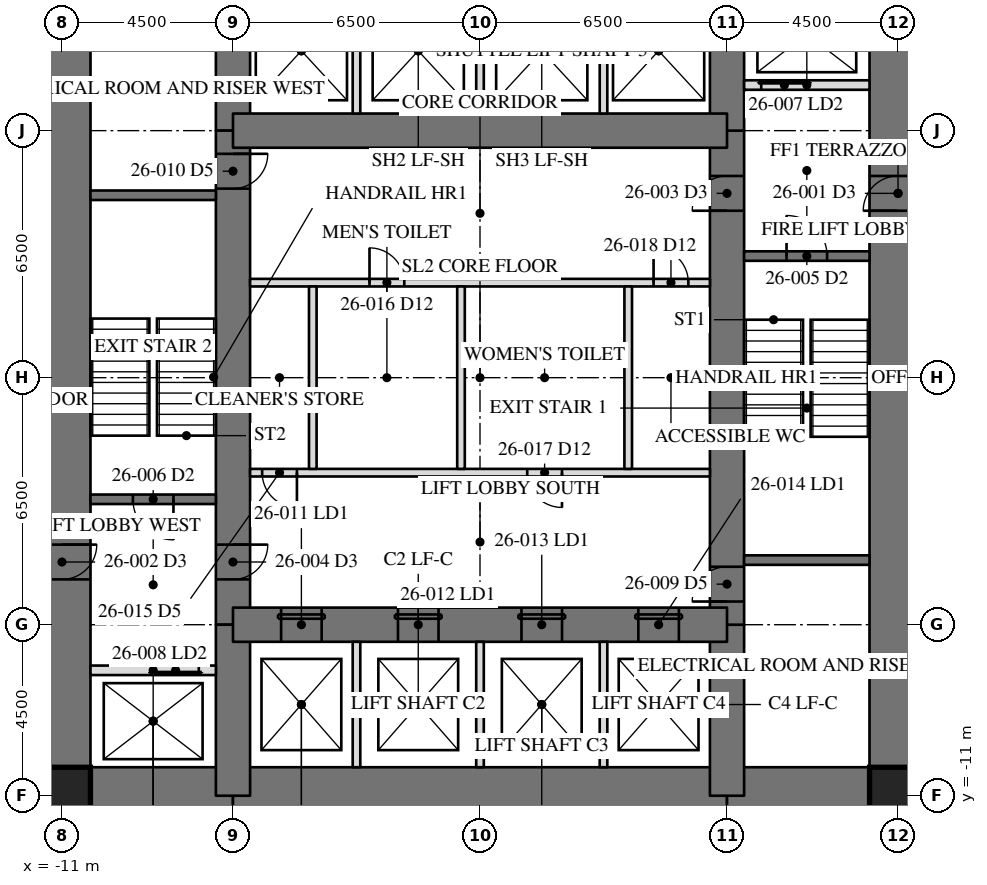
"""IFC4 building model, lengths in metres.
Left out: names, types, materials, properties, quantities, classifications, styles, units other than length and angle.
Written with IfcOpenShell. Run it as: python <this file> out.ifc"""

import sys

from ifc_helpers import new_model, si_unit, direction, frame, frame_2d, origin, origin_2d, place, context, subcontext, project, spatial, rectangle, hollow_rectangle, extrude, element, fill, save


model = new_model("IFC4")
c1 = context("Model", 3, precision=1e-05, world=origin(), true_north=direction((0.0, 1.0)))
c2 = subcontext(c1, "Body", "Model", "MODEL_VIEW")
j1 = project(units=[si_unit("LENGTHUNIT", "METRE"), si_unit("PLANEANGLEUNIT", "RADIAN")], contexts=[c1])
p1 = place(None, origin())
s1 = spatial("IfcSite", under=j1, at=p1, CompositionType="ELEMENT")
p2 = place(p1, origin())
s2 = spatial("IfcBuilding", under=s1, at=p2, CompositionType="ELEMENT")
p3 = place(p2, frame((0.0, 0.0, 113.1)))
s3 = spatial("IfcBuildingStorey", under=s2, at=p3, CompositionType="ELEMENT", Elevation=113.1)
p4 = place(p3, frame((11.0, -11.0, 0.0), z_axis=(0.0, 0.0, 1.0), x_axis=(0.0, 1.0, 0.0)))
e1 = element("IfcWall", 1, at=p4, inside=s3, PredefinedType="SHEAR", context=c2, shape_type="SweptSolid", body=[
    extrude(rectangle(XDim=22.0, YDim=1.5, at=frame_2d((11.0, 0.0))), origin(), (0.0, 0.0, 1.0), 4.1),
])
p5 = place(p4, frame((15.393, 0.0, 0.0)))
e2 = element("IfcOpeningElement", 2, at=p5, cuts=e1, PredefinedType="OPENING", context=c2, shape_type="SweptSolid", body=[
    extrude(rectangle(XDim=0.915, YDim=2.134, at=frame_2d((0.458, 1.067))), frame((0.0, 0.76, 0.0), z_axis=(0.0, -1.0, 0.0), x_axis=(1.0, 0.0, 0.0)), (0.0, 0.0, 1.0), 1.52),
])
p6 = place(p3, frame((-11.0, 11.0, 0.0), z_axis=(0.0, 0.0, 1.0), x_axis=(0.0, -1.0, 0.0)))
e3 = element("IfcWall", 3, at=p6, inside=s3, PredefinedType="SHEAR", context=c2, shape_type="SweptSolid", body=[
    extrude(rectangle(XDim=22.0, YDim=1.5, at=frame_2d((11.0, 0.0))), origin(), (0.0, 0.0, 1.0), 4.1),
])
p7 = place(p6, frame((15.393, 0.0, 0.0)))
e4 = element("IfcOpeningElement", 4, at=p7, cuts=e3, PredefinedType="OPENING", context=c2, shape_type="SweptSolid", body=[
    extrude(rectangle(XDim=0.915, YDim=2.134, at=frame_2d((0.458, 1.067))), frame((0.0, 0.76, 0.0), z_axis=(0.0, -1.0, 0.0), x_axis=(1.0, 0.0, 0.0)), (0.0, 0.0, 1.0), 1.52),
])
p8 = place(p3, frame((-11.0, -11.0, 0.0), z_axis=(0.0, 0.0, 1.0), x_axis=(1.0, 0.0, 0.0)))
e5 = element("IfcWall", 5, at=p8, inside=s3, PredefinedType="SHEAR", context=c2, shape_type="SweptSolid", body=[
    extrude(rectangle(XDim=4.5, YDim=1.5, at=frame_2d((2.25, 0.0))), origin(), (0.0, 0.0, 1.0), 4.1),
])
p9 = place(p3, frame((-6.5, -11.0, 0.0), z_axis=(0.0, 0.0, 1.0), x_axis=(1.0, 0.0, 0.0)))
e6 = element("IfcWall", 6, at=p9, inside=s3, PredefinedType="SHEAR", context=c2, shape_type="SweptSolid", body=[
    extrude(rectangle(XDim=13.0, YDim=1.5, at=frame_2d((6.5, 0.0))), origin(), (0.0, 0.0, 1.0), 4.1),
])
p10 = place(p3, frame((6.5, -11.0, 0.0), z_axis=(0.0, 0.0, 1.0), x_axis=(1.0, 0.0, 0.0)))
e7 = element("IfcWall", 7, at=p10, inside=s3, PredefinedType="SHEAR", context=c2, shape_type="SweptSolid", body=[
    extrude(rectangle(XDim=4.5, YDim=1.5, at=frame_2d((2.25, 0.0))), origin(), (0.0, 0.0, 1.0), 4.1),
])
p11 = place(p3, frame((6.5, -11.0, 0.0), z_axis=(0.0, 0.0, 1.0), x_axis=(0.0, 1.0, 0.0)))
e8 = element("IfcWall", 8, at=p11, inside=s3, PredefinedType="SHEAR", context=c2, shape_type="SweptSolid", body=[
    extrude(rectangle(XDim=4.5, YDim=0.9, at=frame_2d((2.25, 0.0))), origin(), (0.0, 0.0, 1.0), 4.1),
])
p12 = place(p3, frame((6.5, -6.5, 0.0), z_axis=(0.0, 0.0, 1.0), x_axis=(0.0, 1.0, 0.0)))
e9 = element("IfcWall", 9, at=p12, inside=s3, PredefinedType="SHEAR", context=c2, shape_type="SweptSolid", body=[
    extrude(rectangle(XDim=13.0, YDim=0.9, at=frame_2d((6.5, 0.0))), origin(), (0.0, 0.0, 1.0), 4.1),
])
p13 = place(p12, frame((10.893, 0.0, 0.0)))
e10 = element("IfcOpeningElement", 10, at=p13, cuts=e9, PredefinedType="OPENING", context=c2, shape_type="SweptSolid", body=[
    extrude(rectangle(XDim=0.915, YDim=2.134, at=frame_2d((0.458, 1.067))), frame((0.0, 0.46, 0.0), z_axis=(0.0, -1.0, 0.0), x_axis=(1.0, 0.0, 0.0)), (0.0, 0.0, 1.0), 0.92),
])
p14 = place(p12, frame((0.61, 0.0, 0.0)))
e11 = element("IfcOpeningElement", 11, at=p14, cuts=e9, PredefinedType="OPENING", context=c2, shape_type="SweptSolid", body=[
    extrude(rectangle(XDim=0.915, YDim=2.134, at=frame_2d((0.458, 1.067))), frame((0.0, 0.46, 0.0), z_axis=(0.0, -1.0, 0.0), x_axis=(1.0, 0.0, 0.0)), (0.0, 0.0, 1.0), 0.92),
])
for number, where, z_axis, x_axis in (
    (12, (6.5, 6.5, 0.0), (0.0, 0.0, 1.0), (0.0, 1.0, 0.0)),
    (13, (-6.5, 11.0, 0.0), (0.0, 0.0, 1.0), (0.0, -1.0, 0.0)),
):
    element("IfcWall", number, at=place(p3, frame(where, z_axis=z_axis, x_axis=x_axis)), inside=s3, PredefinedType="SHEAR", context=c2, shape_type="SweptSolid", body=[
        extrude(rectangle(XDim=4.5, YDim=0.9, at=frame_2d((2.25, 0.0))), origin(), (0.0, 0.0, 1.0), 4.1),
    ])
p15 = place(p3, frame((-6.5, 6.5, 0.0), z_axis=(0.0, 0.0, 1.0), x_axis=(0.0, -1.0, 0.0)))
e14 = element("IfcWall", 14, at=p15, inside=s3, PredefinedType="SHEAR", context=c2, shape_type="SweptSolid", body=[
    extrude(rectangle(XDim=13.0, YDim=0.9, at=frame_2d((6.5, 0.0))), origin(), (0.0, 0.0, 1.0), 4.1),
])
p16 = place(p15, frame((10.893, 0.0, 0.0)))
e15 = element("IfcOpeningElement", 15, at=p16, cuts=e14, PredefinedType="OPENING", context=c2, shape_type="SweptSolid", body=[
    extrude(rectangle(XDim=0.915, YDim=2.134, at=frame_2d((0.458, 1.067))), frame((0.0, 0.46, 0.0), z_axis=(0.0, -1.0, 0.0), x_axis=(1.0, 0.0, 0.0)), (0.0, 0.0, 1.0), 0.92),
])
p17 = place(p15, frame((0.61, 0.0, 0.0)))
e16 = element("IfcOpeningElement", 16, at=p17, cuts=e14, PredefinedType="OPENING", context=c2, shape_type="SweptSolid", body=[
    extrude(rectangle(XDim=0.915, YDim=2.134, at=frame_2d((0.458, 1.067))), frame((0.0, 0.46, 0.0), z_axis=(0.0, -1.0, 0.0), x_axis=(1.0, 0.0, 0.0)), (0.0, 0.0, 1.0), 0.92),
])
p18 = place(p3, frame((-6.5, -6.5, 0.0), z_axis=(0.0, 0.0, 1.0), x_axis=(0.0, -1.0, 0.0)))
e17 = element("IfcWall", 17, at=p18, inside=s3, PredefinedType="SHEAR", context=c2, shape_type="SweptSolid", body=[
    extrude(rectangle(XDim=4.5, YDim=0.9, at=frame_2d((2.25, 0.0))), origin(), (0.0, 0.0, 1.0), 4.1),
])
p19 = place(p3, frame((6.5, 6.5, 0.0), z_axis=(0.0, 0.0, 1.0), x_axis=(-1.0, 0.0, 0.0)))
e18 = element("IfcWall", 18, at=p19, inside=s3, PredefinedType="SHEAR", context=c2, shape_type="SweptSolid", body=[
    extrude(rectangle(XDim=13.0, YDim=0.9, at=frame_2d((6.5, 0.0))), origin(), (0.0, 0.0, 1.0), 4.1),
])
p20 = place(p3, frame((-6.5, -6.5, 0.0), z_axis=(0.0, 0.0, 1.0), x_axis=(1.0, 0.0, 0.0)))
e19 = element("IfcWall", 19, at=p20, inside=s3, PredefinedType="SHEAR", context=c2, shape_type="SweptSolid", body=[
    extrude(rectangle(XDim=13.0, YDim=0.9, at=frame_2d((6.5, 0.0))), origin(), (0.0, 0.0, 1.0), 4.1),
])
p21 = place(p20, frame((1.267, 0.0, 0.0)))
e20 = element("IfcOpeningElement", 20, at=p21, cuts=e19, PredefinedType="OPENING", context=c2, shape_type="SweptSolid", body=[
    extrude(rectangle(XDim=1.067, YDim=2.134, at=frame_2d((0.533, 1.067))), frame((0.0, 0.46, 0.0), z_axis=(0.0, -1.0, 0.0), x_axis=(1.0, 0.0, 0.0)), (0.0, 0.0, 1.0), 0.92),
])
p22 = place(p20, frame((4.342, 0.0, 0.0)))
e21 = element("IfcOpeningElement", 21, at=p22, cuts=e19, PredefinedType="OPENING", context=c2, shape_type="SweptSolid", body=[
    extrude(rectangle(XDim=1.067, YDim=2.134, at=frame_2d((0.533, 1.067))), frame((0.0, 0.46, 0.0), z_axis=(0.0, -1.0, 0.0), x_axis=(1.0, 0.0, 0.0)), (0.0, 0.0, 1.0), 0.92),
])
p23 = place(p20, frame((7.592, 0.0, 0.0)))
e22 = element("IfcOpeningElement", 22, at=p23, cuts=e19, PredefinedType="OPENING", context=c2, shape_type="SweptSolid", body=[
    extrude(rectangle(XDim=1.067, YDim=2.134, at=frame_2d((0.533, 1.067))), frame((0.0, 0.46, 0.0), z_axis=(0.0, -1.0, 0.0), x_axis=(1.0, 0.0, 0.0)), (0.0, 0.0, 1.0), 0.92),
])
p24 = place(p20, frame((10.667, 0.0, 0.0)))
e23 = element("IfcOpeningElement", 23, at=p24, cuts=e19, PredefinedType="OPENING", context=c2, shape_type="SweptSolid", body=[
    extrude(rectangle(XDim=1.067, YDim=2.134, at=frame_2d((0.533, 1.067))), frame((0.0, 0.46, 0.0), z_axis=(0.0, -1.0, 0.0), x_axis=(1.0, 0.0, 0.0)), (0.0, 0.0, 1.0), 0.92),
])
for number, where, z_axis, x_axis in (
    (24, (-11.0, -11.0, 0.0), (0.0, 0.0, 1.0), (1.0, 0.0, 0.0)),
    (25, (11.0, -11.0, 0.0), (0.0, 0.0, 1.0), (1.0, 0.0, 0.0)),
):
    element("IfcColumn", number, at=place(p3, frame(where, z_axis=z_axis, x_axis=x_axis)), inside=s3, PredefinedType="COLUMN", context=c2, shape_type="SweptSolid", body=[
        extrude(hollow_rectangle(XDim=1.499, YDim=1.499, WallThickness=0.102, at=origin_2d()), origin(), (0.0, 0.0, 1.0), 4.1),
    ])
for number, where, z_axis, x_axis in (
    (26, (6.95, -4.8, 0.0), (0.0, 0.0, 1.0), (1.0, 0.0, 0.0)),
    (27, (-6.95, 4.8, 0.0), (0.0, 0.0, 1.0), (-1.0, 0.0, 0.0)),
):
    element("IfcWall", number, at=place(p3, frame(where, z_axis=z_axis, x_axis=x_axis)), inside=s3, PredefinedType="SOLIDWALL", context=c2, shape_type="SweptSolid", body=[
        extrude(rectangle(XDim=3.3, YDim=0.25, at=frame_2d((1.65, 0.0))), origin(), (0.0, 0.0, 1.0), 3.91),
    ])
p25 = place(p3, frame((6.95, 3.2, 0.0), z_axis=(0.0, 0.0, 1.0), x_axis=(1.0, 0.0, 0.0)))
e28 = element("IfcWall", 28, at=p25, inside=s3, PredefinedType="SOLIDWALL", context=c2, shape_type="SweptSolid", body=[
    extrude(rectangle(XDim=3.3, YDim=0.25, at=frame_2d((1.65, 0.0))), origin(), (0.0, 0.0, 1.0), 3.91),
])
p26 = place(p25, frame((1.116, 0.0, 0.0)))
e29 = element("IfcOpeningElement", 29, at=p26, cuts=e28, PredefinedType="OPENING", context=c2, shape_type="SweptSolid", body=[
    extrude(rectangle(XDim=1.067, YDim=2.134, at=frame_2d((0.533, 1.067))), frame((0.0, 0.135, 0.0), z_axis=(0.0, -1.0, 0.0), x_axis=(1.0, 0.0, 0.0)), (0.0, 0.0, 1.0), 0.27),
])
p27 = place(p3, frame((-6.95, -3.2, 0.0), z_axis=(0.0, 0.0, 1.0), x_axis=(-1.0, 0.0, 0.0)))
e30 = element("IfcWall", 30, at=p27, inside=s3, PredefinedType="SOLIDWALL", context=c2, shape_type="SweptSolid", body=[
    extrude(rectangle(XDim=3.3, YDim=0.25, at=frame_2d((1.65, 0.0))), origin(), (0.0, 0.0, 1.0), 3.91),
])
p28 = place(p27, frame((1.116, 0.0, 0.0)))
e31 = element("IfcOpeningElement", 31, at=p28, cuts=e30, PredefinedType="OPENING", context=c2, shape_type="SweptSolid", body=[
    extrude(rectangle(XDim=1.067, YDim=2.134, at=frame_2d((0.533, 1.067))), frame((0.0, 0.135, 0.0), z_axis=(0.0, -1.0, 0.0), x_axis=(1.0, 0.0, 0.0)), (0.0, 0.0, 1.0), 0.27),
])
p29 = place(p3, frame((6.95, 7.7, 0.0), z_axis=(0.0, 0.0, 1.0), x_axis=(1.0, 0.0, 0.0)))
e32 = element("IfcWall", 32, at=p29, inside=s3, PredefinedType="PARTITIONING", context=c2, shape_type="SweptSolid", body=[
    extrude(rectangle(XDim=3.3, YDim=0.25, at=frame_2d((1.65, 0.0))), origin(), (0.0, 0.0, 1.0), 3.91),
])
p30 = place(p29, frame((0.45, 0.0, 0.0)))
e33 = element("IfcOpeningElement", 33, at=p30, cuts=e32, PredefinedType="OPENING", context=c2, shape_type="SweptSolid", body=[
    extrude(rectangle(XDim=1.219, YDim=2.134, at=frame_2d((0.609, 1.067))), frame((0.0, 0.135, 0.0), z_axis=(0.0, -1.0, 0.0), x_axis=(1.0, 0.0, 0.0)), (0.0, 0.0, 1.0), 0.27),
])
p31 = place(p3, frame((-6.95, -7.7, 0.0), z_axis=(0.0, 0.0, 1.0), x_axis=(-1.0, 0.0, 0.0)))
e34 = element("IfcWall", 34, at=p31, inside=s3, PredefinedType="PARTITIONING", context=c2, shape_type="SweptSolid", body=[
    extrude(rectangle(XDim=3.3, YDim=0.25, at=frame_2d((1.65, 0.0))), origin(), (0.0, 0.0, 1.0), 3.91),
])
p32 = place(p31, frame((0.45, 0.0, 0.0)))
e35 = element("IfcOpeningElement", 35, at=p32, cuts=e34, PredefinedType="OPENING", context=c2, shape_type="SweptSolid", body=[
    extrude(rectangle(XDim=1.219, YDim=2.134, at=frame_2d((0.609, 1.067))), frame((0.0, 0.135, 0.0), z_axis=(0.0, -1.0, 0.0), x_axis=(1.0, 0.0, 0.0)), (0.0, 0.0, 1.0), 0.27),
])
p33 = place(p3, frame((-6.05, 2.5, 0.0), z_axis=(0.0, 0.0, 1.0), x_axis=(1.0, 0.0, 0.0)))
e36 = element("IfcWall", 36, at=p33, inside=s3, PredefinedType="PARTITIONING", context=c2, shape_type="SweptSolid", body=[
    extrude(rectangle(XDim=12.1, YDim=0.2, at=frame_2d((6.05, 0.0))), origin(), (0.0, 0.0, 1.0), 3.91),
])
p34 = place(p33, frame((3.143, 0.0, 0.0)))
e37 = element("IfcOpeningElement", 37, at=p34, cuts=e36, PredefinedType="OPENING", context=c2, shape_type="SweptSolid", body=[
    extrude(rectangle(XDim=0.915, YDim=2.134, at=frame_2d((0.458, 1.067))), frame((0.0, 0.11, 0.0), z_axis=(0.0, -1.0, 0.0), x_axis=(1.0, 0.0, 0.0)), (0.0, 0.0, 1.0), 0.22),
])
p35 = place(p33, frame((10.617, 0.0, 0.0)))
e38 = element("IfcOpeningElement", 38, at=p35, cuts=e36, PredefinedType="OPENING", context=c2, shape_type="SweptSolid", body=[
    extrude(rectangle(XDim=0.915, YDim=2.134, at=frame_2d((0.458, 1.067))), frame((0.0, 0.11, 0.0), z_axis=(0.0, -1.0, 0.0), x_axis=(1.0, 0.0, 0.0)), (0.0, 0.0, 1.0), 0.22),
])
p36 = place(p3, frame((6.05, -2.5, 0.0), z_axis=(0.0, 0.0, 1.0), x_axis=(-1.0, 0.0, 0.0)))
e39 = element("IfcWall", 39, at=p36, inside=s3, PredefinedType="PARTITIONING", context=c2, shape_type="SweptSolid", body=[
    extrude(rectangle(XDim=12.1, YDim=0.2, at=frame_2d((6.05, 0.0))), origin(), (0.0, 0.0, 1.0), 3.91),
])
p37 = place(p36, frame((10.867, 0.0, 0.0)))
e40 = element("IfcOpeningElement", 40, at=p37, cuts=e39, PredefinedType="OPENING", context=c2, shape_type="SweptSolid", body=[
    extrude(rectangle(XDim=0.915, YDim=2.134, at=frame_2d((0.458, 1.067))), frame((0.0, 0.11, 0.0), z_axis=(0.0, -1.0, 0.0), x_axis=(1.0, 0.0, 0.0)), (0.0, 0.0, 1.0), 0.22),
])
p38 = place(p36, frame((3.893, 0.0, 0.0)))
e41 = element("IfcOpeningElement", 41, at=p38, cuts=e39, PredefinedType="OPENING", context=c2, shape_type="SweptSolid", body=[
    extrude(rectangle(XDim=0.915, YDim=2.134, at=frame_2d((0.458, 1.067))), frame((0.0, 0.11, 0.0), z_axis=(0.0, -1.0, 0.0), x_axis=(1.0, 0.0, 0.0)), (0.0, 0.0, 1.0), 0.22),
])
for number, where, z_axis, x_axis in (
    (42, (-3.25, 6.95, 0.0), (0.0, 0.0, 1.0), (0.0, 1.0, 0.0)),
    (43, (0.0, 6.95, 0.0), (0.0, 0.0, 1.0), (0.0, 1.0, 0.0)),
    (44, (3.25, 6.95, 0.0), (0.0, 0.0, 1.0), (0.0, 1.0, 0.0)),
    (45, (-3.25, -10.25, 0.0), (0.0, 0.0, 1.0), (0.0, 1.0, 0.0)),
    (46, (0.0, -10.25, 0.0), (0.0, 0.0, 1.0), (0.0, 1.0, 0.0)),
    (47, (3.25, -10.25, 0.0), (0.0, 0.0, 1.0), (0.0, 1.0, 0.0)),
):
    element("IfcWall", number, at=place(p3, frame(where, z_axis=z_axis, x_axis=x_axis)), inside=s3, PredefinedType="PARTITIONING", context=c2, shape_type="SweptSolid", body=[
        extrude(rectangle(XDim=3.3, YDim=0.2, at=frame_2d((1.65, 0.0))), origin(), (0.0, 0.0, 1.0), 3.91),
    ])
for number, where, z_axis, x_axis in (
    (48, (-4.4, -2.4, 0.0), (0.0, 0.0, 1.0), (0.0, 1.0, 0.0)),
    (49, (-0.5, -2.4, 0.0), (0.0, 0.0, 1.0), (0.0, 1.0, 0.0)),
    (50, (3.9, -2.4, 0.0), (0.0, 0.0, 1.0), (0.0, 1.0, 0.0)),
):
    element("IfcWall", number, at=place(p3, frame(where, z_axis=z_axis, x_axis=x_axis)), inside=s3, PredefinedType="PARTITIONING", context=c2, shape_type="SweptSolid", body=[
        extrude(rectangle(XDim=4.8, YDim=0.2, at=frame_2d((2.4, 0.0))), origin(), (0.0, 0.0, 1.0), 3.91),
    ])
p39 = place(p13, origin())
e51 = element("IfcDoor", 51, at=p39, inside=s3, OperationType="SINGLE_SWING_RIGHT", PredefinedType="DOOR", context=c2, shape_type="SweptSolid", body=[
    extrude(rectangle(XDim=0.915, YDim=2.134, at=frame_2d((0.458, 1.067))), frame((0.0, -0.375, 0.0), z_axis=(0.0, -1.0, 0.0), x_axis=(1.0, 0.0, 0.0)), (0.0, 0.0, 1.0), 0.05),
])
fill(e10, e51)
p40 = place(p16, origin())
e52 = element("IfcDoor", 52, at=p40, inside=s3, OperationType="SINGLE_SWING_RIGHT", PredefinedType="DOOR", context=c2, shape_type="SweptSolid", body=[
    extrude(rectangle(XDim=0.915, YDim=2.134, at=frame_2d((0.458, 1.067))), frame((0.0, -0.375, 0.0), z_axis=(0.0, -1.0, 0.0), x_axis=(1.0, 0.0, 0.0)), (0.0, 0.0, 1.0), 0.05),
])
fill(e15, e52)
p41 = place(p26, origin())
e53 = element("IfcDoor", 53, at=p41, inside=s3, OperationType="SINGLE_SWING_LEFT", PredefinedType="DOOR", context=c2, shape_type="SweptSolid", body=[
    extrude(rectangle(XDim=1.067, YDim=2.134, at=frame_2d((0.533, 1.067))), frame((0.0, 0.025, 0.0), z_axis=(0.0, -1.0, 0.0), x_axis=(1.0, 0.0, 0.0)), (0.0, 0.0, 1.0), 0.05),
])
fill(e29, e53)
p42 = place(p28, origin())
e54 = element("IfcDoor", 54, at=p42, inside=s3, OperationType="SINGLE_SWING_LEFT", PredefinedType="DOOR", context=c2, shape_type="SweptSolid", body=[
    extrude(rectangle(XDim=1.067, YDim=2.134, at=frame_2d((0.533, 1.067))), frame((0.0, 0.025, 0.0), z_axis=(0.0, -1.0, 0.0), x_axis=(1.0, 0.0, 0.0)), (0.0, 0.0, 1.0), 0.05),
])
fill(e31, e54)
p43 = place(p30, origin())
e55 = element("IfcDoor", 55, at=p43, inside=s3, OperationType="SLIDING_TO_LEFT", PredefinedType="DOOR", context=c2, shape_type="SweptSolid", body=[
    extrude(rectangle(XDim=1.219, YDim=2.134, at=frame_2d((0.609, 1.067))), frame((0.0, 0.025, 0.0), z_axis=(0.0, -1.0, 0.0), x_axis=(1.0, 0.0, 0.0)), (0.0, 0.0, 1.0), 0.05),
])
fill(e33, e55)
p44 = place(p32, origin())
e56 = element("IfcDoor", 56, at=p44, inside=s3, OperationType="SLIDING_TO_LEFT", PredefinedType="DOOR", context=c2, shape_type="SweptSolid", body=[
    extrude(rectangle(XDim=1.219, YDim=2.134, at=frame_2d((0.609, 1.067))), frame((0.0, 0.025, 0.0), z_axis=(0.0, -1.0, 0.0), x_axis=(1.0, 0.0, 0.0)), (0.0, 0.0, 1.0), 0.05),
])
fill(e35, e56)
p45 = place(p14, origin())
e57 = element("IfcDoor", 57, at=p45, inside=s3, OperationType="SINGLE_SWING_RIGHT", PredefinedType="DOOR", context=c2, shape_type="SweptSolid", body=[
    extrude(rectangle(XDim=0.915, YDim=2.134, at=frame_2d((0.458, 1.067))), frame((0.0, -0.375, 0.0), z_axis=(0.0, -1.0, 0.0), x_axis=(1.0, 0.0, 0.0)), (0.0, 0.0, 1.0), 0.05),
])
fill(e11, e57)
p46 = place(p17, origin())
e58 = element("IfcDoor", 58, at=p46, inside=s3, OperationType="SINGLE_SWING_RIGHT", PredefinedType="DOOR", context=c2, shape_type="SweptSolid", body=[
    extrude(rectangle(XDim=0.915, YDim=2.134, at=frame_2d((0.458, 1.067))), frame((0.0, -0.375, 0.0), z_axis=(0.0, -1.0, 0.0), x_axis=(1.0, 0.0, 0.0)), (0.0, 0.0, 1.0), 0.05),
])
fill(e16, e58)
p47 = place(p21, origin())
e59 = element("IfcDoor", 59, at=p47, inside=s3, OperationType="SLIDING_TO_LEFT", PredefinedType="DOOR", context=c2, shape_type="SweptSolid", body=[
    extrude(rectangle(XDim=1.067, YDim=2.134, at=frame_2d((0.533, 1.067))), frame((0.0, -0.375, 0.0), z_axis=(0.0, -1.0, 0.0), x_axis=(1.0, 0.0, 0.0)), (0.0, 0.0, 1.0), 0.05),
])
fill(e20, e59)
p48 = place(p22, origin())
e60 = element("IfcDoor", 60, at=p48, inside=s3, OperationType="SLIDING_TO_LEFT", PredefinedType="DOOR", context=c2, shape_type="SweptSolid", body=[
    extrude(rectangle(XDim=1.067, YDim=2.134, at=frame_2d((0.533, 1.067))), frame((0.0, -0.375, 0.0), z_axis=(0.0, -1.0, 0.0), x_axis=(1.0, 0.0, 0.0)), (0.0, 0.0, 1.0), 0.05),
])
fill(e21, e60)
p49 = place(p23, origin())
e61 = element("IfcDoor", 61, at=p49, inside=s3, OperationType="SLIDING_TO_LEFT", PredefinedType="DOOR", context=c2, shape_type="SweptSolid", body=[
    extrude(rectangle(XDim=1.067, YDim=2.134, at=frame_2d((0.533, 1.067))), frame((0.0, -0.375, 0.0), z_axis=(0.0, -1.0, 0.0), x_axis=(1.0, 0.0, 0.0)), (0.0, 0.0, 1.0), 0.05),
])
fill(e22, e61)
p50 = place(p24, origin())
e62 = element("IfcDoor", 62, at=p50, inside=s3, OperationType="SLIDING_TO_LEFT", PredefinedType="DOOR", context=c2, shape_type="SweptSolid", body=[
    extrude(rectangle(XDim=1.067, YDim=2.134, at=frame_2d((0.533, 1.067))), frame((0.0, -0.375, 0.0), z_axis=(0.0, -1.0, 0.0), x_axis=(1.0, 0.0, 0.0)), (0.0, 0.0, 1.0), 0.05),
])
fill(e23, e62)
p51 = place(p37, origin())
e63 = element("IfcDoor", 63, at=p51, inside=s3, OperationType="SINGLE_SWING_RIGHT", PredefinedType="DOOR", context=c2, shape_type="SweptSolid", body=[
    extrude(rectangle(XDim=0.915, YDim=2.134, at=frame_2d((0.458, 1.067))), frame((0.0, 0.025, 0.0), z_axis=(0.0, -1.0, 0.0), x_axis=(1.0, 0.0, 0.0)), (0.0, 0.0, 1.0), 0.05),
])
fill(e40, e63)
p52 = place(p34, origin())
e64 = element("IfcDoor", 64, at=p52, inside=s3, OperationType="SINGLE_SWING_LEFT", PredefinedType="DOOR", context=c2, shape_type="SweptSolid", body=[
    extrude(rectangle(XDim=0.915, YDim=2.134, at=frame_2d((0.458, 1.067))), frame((0.0, 0.025, 0.0), z_axis=(0.0, -1.0, 0.0), x_axis=(1.0, 0.0, 0.0)), (0.0, 0.0, 1.0), 0.05),
])
fill(e37, e64)
p53 = place(p38, origin())
e65 = element("IfcDoor", 65, at=p53, inside=s3, OperationType="SINGLE_SWING_LEFT", PredefinedType="DOOR", context=c2, shape_type="SweptSolid", body=[
    extrude(rectangle(XDim=0.915, YDim=2.134, at=frame_2d((0.458, 1.067))), frame((0.0, 0.025, 0.0), z_axis=(0.0, -1.0, 0.0), x_axis=(1.0, 0.0, 0.0)), (0.0, 0.0, 1.0), 0.05),
])
fill(e41, e65)
p54 = place(p35, origin())
e66 = element("IfcDoor", 66, at=p54, inside=s3, OperationType="SINGLE_SWING_LEFT", PredefinedType="DOOR", context=c2, shape_type="SweptSolid", body=[
    extrude(rectangle(XDim=0.915, YDim=2.134, at=frame_2d((0.458, 1.067))), frame((0.0, 0.025, 0.0), z_axis=(0.0, -1.0, 0.0), x_axis=(1.0, 0.0, 0.0)), (0.0, 0.0, 1.0), 0.05),
])
fill(e38, e66)
save(model, sys.argv[1])
